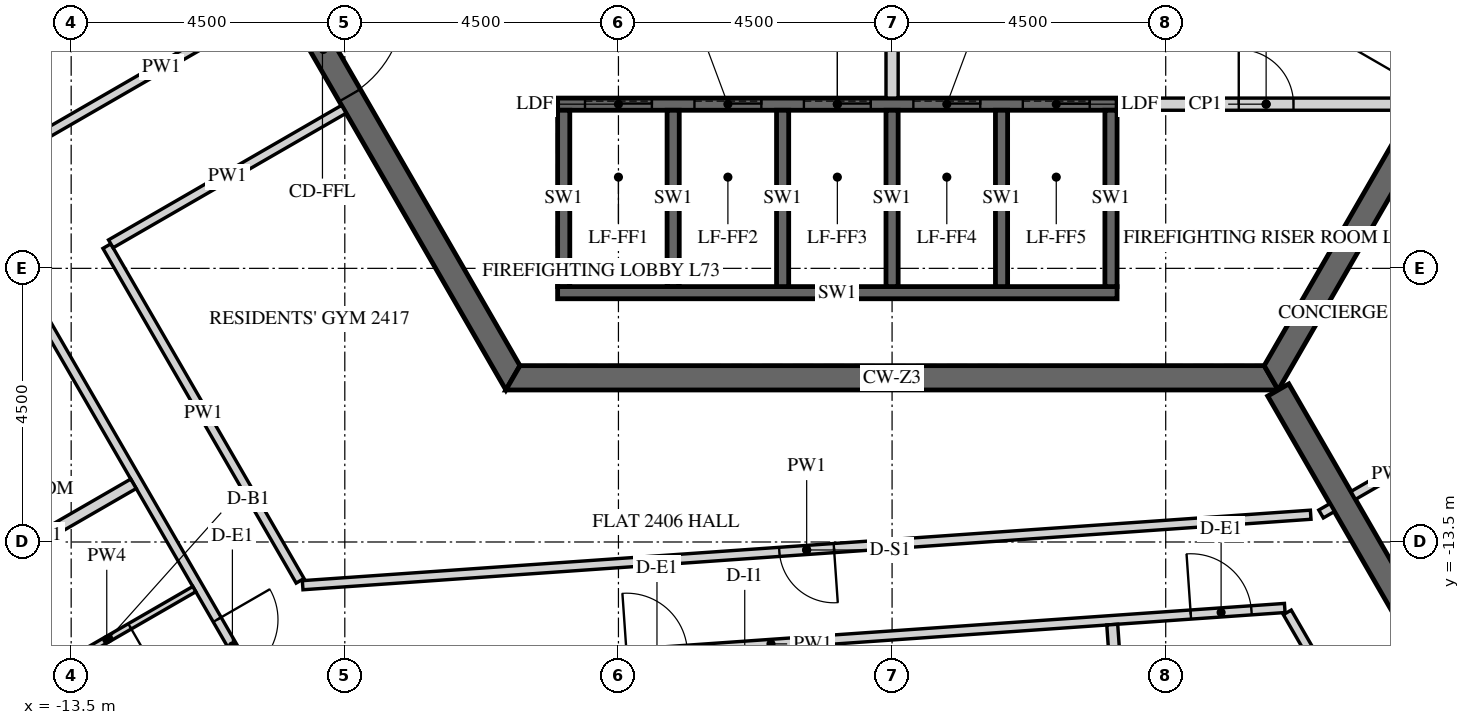
"""IFC4 building model, lengths in metres.
Left out: names, types, materials, properties, quantities, classifications, styles, units other than length and angle.
Written with IfcOpenShell. Run it as: python <this file> out.ifc"""

import sys

from ifc_helpers import new_model, si_unit, direction, frame, frame_2d, origin, place, context, subcontext, project, spatial, polyline, rectangle, outline, extrude, element, fill, save


model = new_model("IFC4")
c1 = context("Model", 3, precision=1e-05, world=origin(), true_north=direction((0.0, 1.0)))
c2 = subcontext(c1, "Body", "Model", "MODEL_VIEW")
j1 = project(units=[si_unit("LENGTHUNIT", "METRE"), si_unit("PLANEANGLEUNIT", "RADIAN")], contexts=[c1])
p1 = place(None, origin())
s1 = spatial("IfcSite", under=j1, at=p1, CompositionType="ELEMENT")
p2 = place(p1, origin())
s2 = spatial("IfcBuilding", under=s1, at=p2, CompositionType="ELEMENT")
p3 = place(p2, frame((0.0, 0.0, 303.0)))
s3 = spatial("IfcBuildingStorey", under=s2, at=p3, CompositionType="ELEMENT", Elevation=303.0)
p4 = place(p3, frame((-12.471, 0.0, -0.15), z_axis=(0.0, 0.0, 1.0), x_axis=(0.499996419489, -0.866027470984, 0.0)))
e1 = element("IfcWall", 1, at=p4, inside=s3, PredefinedType="SHEAR", context=c2, shape_type="SweptSolid", body=[
    extrude(outline(polyline([(-0.115, -0.2), (12.586, -0.2), (12.355, 0.2), (0.115, 0.2), (-0.115, -0.2)])), origin(), (0.0, 0.0, 1.0), 3.9),
])
p5 = place(p4, frame((5.306, 0.0, 0.15)))
e2 = element("IfcOpeningElement", 2, at=p5, cuts=e1, PredefinedType="OPENING", context=c2, shape_type="SweptSolid", body=[
    extrude(rectangle(XDim=1.8, YDim=2.4, at=frame_2d((0.9, 1.2))), frame((0.0, 0.21, 0.0), z_axis=(0.0, -1.0, 0.0), x_axis=(1.0, 0.0, 0.0)), (0.0, 0.0, 1.0), 0.42),
])
p6 = place(p3, frame((-6.235, -10.8, -0.15), z_axis=(0.0, 0.0, 1.0), x_axis=(1.0, 0.0, 0.0)))
e3 = element("IfcWall", 3, at=p6, inside=s3, PredefinedType="SHEAR", context=c2, shape_type="SweptSolid", body=[
    extrude(outline(polyline([(-0.115, -0.2), (12.586, -0.2), (12.355, 0.2), (0.115, 0.2), (-0.115, -0.2)])), origin(), (0.0, 0.0, 1.0), 3.9),
])
p7 = place(p3, frame((6.235, -10.8, -0.15), z_axis=(0.0, 0.0, 1.0), x_axis=(0.499996419489, 0.866027470984, 0.0)))
e4 = element("IfcWall", 4, at=p7, inside=s3, PredefinedType="SHEAR", context=c2, shape_type="SweptSolid", body=[
    extrude(outline(polyline([(-0.115, -0.2), (12.586, -0.2), (12.355, 0.2), (0.115, 0.2), (-0.115, -0.2)])), origin(), (0.0, 0.0, 1.0), 3.9),
])
p8 = place(p7, frame((5.364, 0.0, 0.15)))
e5 = element("IfcOpeningElement", 5, at=p8, cuts=e4, PredefinedType="OPENING", context=c2, shape_type="SweptSolid", body=[
    extrude(rectangle(XDim=1.8, YDim=2.4, at=frame_2d((0.9, 1.2))), frame((0.0, 0.21, 0.0), z_axis=(0.0, -1.0, 0.0), x_axis=(1.0, 0.0, 0.0)), (0.0, 0.0, 1.0), 0.42),
])
p9 = place(p3, frame((6.351, -11.0, -0.15), z_axis=(0.0, 0.0, 1.0), x_axis=(0.499998894578, -0.866026041999, 0.0)))
e6 = element("IfcWall", 6, at=p9, inside=s3, PredefinedType="SHEAR", context=c2, shape_type="SweptSolid", body=[
    extrude(rectangle(XDim=15.544, YDim=0.4, at=frame_2d((7.772, 0.0))), origin(), (0.0, 0.0, 1.0), 3.9),
])
p10 = place(p9, frame((6.872, 0.0, 0.15)))
e7 = element("IfcOpeningElement", 7, at=p10, cuts=e6, PredefinedType="OPENING", context=c2, shape_type="SweptSolid", body=[
    extrude(rectangle(XDim=1.8, YDim=2.4, at=frame_2d((0.9, 1.2))), frame((0.0, 0.21, 0.0), z_axis=(0.0, -1.0, 0.0), x_axis=(1.0, 0.0, 0.0)), (0.0, 0.0, 1.0), 0.42),
])
p11 = place(p3, frame((-5.5, -6.3, -0.25), z_axis=(0.0, 0.0, 1.0), x_axis=(1.0, 0.0, 0.0)))
e8 = element("IfcWall", 8, at=p11, inside=s3, PredefinedType="SHEAR", context=c2, shape_type="SweptSolid", body=[
    extrude(rectangle(XDim=9.2, YDim=0.2, at=frame_2d((4.6, 0.0))), origin(), (0.0, 0.0, 1.0), 3.9),
])
p12 = place(p11, frame((0.45, 0.0, 0.25)))
e9 = element("IfcOpeningElement", 9, at=p12, cuts=e8, PredefinedType="OPENING", context=c2, shape_type="SweptSolid", body=[
    extrude(rectangle(XDim=1.1, YDim=2.1, at=frame_2d((0.55, 1.05))), frame((0.0, 0.11, 0.0), z_axis=(0.0, -1.0, 0.0), x_axis=(1.0, 0.0, 0.0)), (0.0, 0.0, 1.0), 0.22),
])
p13 = place(p11, frame((2.25, 0.0, 0.25)))
e10 = element("IfcOpeningElement", 10, at=p13, cuts=e8, PredefinedType="OPENING", context=c2, shape_type="SweptSolid", body=[
    extrude(rectangle(XDim=1.1, YDim=2.1, at=frame_2d((0.55, 1.05))), frame((0.0, 0.11, 0.0), z_axis=(0.0, -1.0, 0.0), x_axis=(1.0, 0.0, 0.0)), (0.0, 0.0, 1.0), 0.22),
])
p14 = place(p11, frame((4.05, 0.0, 0.25)))
e11 = element("IfcOpeningElement", 11, at=p14, cuts=e8, PredefinedType="OPENING", context=c2, shape_type="SweptSolid", body=[
    extrude(rectangle(XDim=1.1, YDim=2.1, at=frame_2d((0.55, 1.05))), frame((0.0, 0.11, 0.0), z_axis=(0.0, -1.0, 0.0), x_axis=(1.0, 0.0, 0.0)), (0.0, 0.0, 1.0), 0.22),
])
p15 = place(p11, frame((5.85, 0.0, 0.25)))
e12 = element("IfcOpeningElement", 12, at=p15, cuts=e8, PredefinedType="OPENING", context=c2, shape_type="SweptSolid", body=[
    extrude(rectangle(XDim=1.1, YDim=2.1, at=frame_2d((0.55, 1.05))), frame((0.0, 0.11, 0.0), z_axis=(0.0, -1.0, 0.0), x_axis=(1.0, 0.0, 0.0)), (0.0, 0.0, 1.0), 0.22),
])
p16 = place(p11, frame((7.65, 0.0, 0.25)))
e13 = element("IfcOpeningElement", 13, at=p16, cuts=e8, PredefinedType="OPENING", context=c2, shape_type="SweptSolid", body=[
    extrude(rectangle(XDim=1.1, YDim=2.1, at=frame_2d((0.55, 1.05))), frame((0.0, 0.11, 0.0), z_axis=(0.0, -1.0, 0.0), x_axis=(1.0, 0.0, 0.0)), (0.0, 0.0, 1.0), 0.22),
])
p17 = place(p3, frame((-5.5, -9.4, -0.25), z_axis=(0.0, 0.0, 1.0), x_axis=(1.0, 0.0, 0.0)))
e14 = element("IfcWall", 14, at=p17, inside=s3, PredefinedType="SHEAR", context=c2, shape_type="SweptSolid", body=[
    extrude(rectangle(XDim=9.2, YDim=0.2, at=frame_2d((4.6, 0.0))), origin(), (0.0, 0.0, 1.0), 3.9),
])
for number, where, z_axis, x_axis in (
    (15, (-5.4, -9.3, -0.25), (0.0, 0.0, 1.0), (0.0, 1.0, 0.0)),
    (16, (-3.6, -9.3, -0.25), (0.0, 0.0, 1.0), (0.0, 1.0, 0.0)),
    (17, (-1.8, -9.3, -0.25), (0.0, 0.0, 1.0), (0.0, 1.0, 0.0)),
    (18, (0.0, -9.3, -0.25), (0.0, 0.0, 1.0), (0.0, 1.0, 0.0)),
    (19, (1.8, -9.3, -0.25), (0.0, 0.0, 1.0), (0.0, 1.0, 0.0)),
    (20, (3.6, -9.3, -0.25), (0.0, 0.0, 1.0), (0.0, 1.0, 0.0)),
):
    element("IfcWall", number, at=place(p3, frame(where, z_axis=z_axis, x_axis=x_axis)), inside=s3, PredefinedType="SHEAR", context=c2, shape_type="SweptSolid", body=[
        extrude(rectangle(XDim=2.9, YDim=0.2, at=frame_2d((1.45, 0.0))), origin(), (0.0, 0.0, 1.0), 3.9),
    ])
p18 = place(p3, frame((0.0, -6.2, 0.0), z_axis=(0.0, 0.0, 1.0), x_axis=(0.0, 1.0, 0.0)))
e21 = element("IfcWall", 21, at=p18, inside=s3, PredefinedType="PARTITIONING", context=c2, shape_type="SweptSolid", body=[
    extrude(rectangle(XDim=6.1, YDim=0.2, at=frame_2d((3.05, 0.0))), origin(), (0.0, 0.0, 1.0), 3.65),
])
p19 = place(p3, frame((3.7, -6.3, 0.0), z_axis=(0.0, 0.0, 1.0), x_axis=(1.0, 0.0, 0.0)))
e22 = element("IfcWall", 22, at=p19, inside=s3, PredefinedType="PARTITIONING", context=c2, shape_type="SweptSolid", body=[
    extrude(rectangle(XDim=4.903, YDim=0.2, at=frame_2d((2.451, 0.0))), origin(), (0.0, 0.0, 1.0), 3.65),
])
p20 = place(p19, frame((2.001, 0.0, 0.0)))
e23 = element("IfcOpeningElement", 23, at=p20, cuts=e22, PredefinedType="OPENING", context=c2, shape_type="SweptSolid", body=[
    extrude(rectangle(XDim=0.9, YDim=2.1, at=frame_2d((0.45, 1.05))), frame((0.0, 0.11, 0.0), z_axis=(0.0, -1.0, 0.0), x_axis=(1.0, 0.0, 0.0)), (0.0, 0.0, 1.0), 0.22),
])
p21 = place(p3, frame((-18.036, -2.761, 0.0), z_axis=(0.0, 0.0, 1.0), x_axis=(0.499996279807, -0.866027551628, 0.0)))
e24 = element("IfcWall", 24, at=p21, inside=s3, PredefinedType="PARTITIONING", context=c2, shape_type="SweptSolid", body=[
    extrude(rectangle(XDim=15.024, YDim=0.15, at=frame_2d((7.512, 0.0))), origin(), (0.0, 0.0, 1.0), 2.988),
])
p22 = place(p21, frame((0.8, 0.0, 0.0)))
e25 = element("IfcOpeningElement", 25, at=p22, cuts=e24, PredefinedType="OPENING", context=c2, shape_type="SweptSolid", body=[
    extrude(rectangle(XDim=1.0, YDim=2.1, at=frame_2d((0.5, 1.05))), frame((0.0, 0.085, 0.0), z_axis=(0.0, -1.0, 0.0), x_axis=(1.0, 0.0, 0.0)), (0.0, 0.0, 1.0), 0.17),
])
p23 = place(p21, frame((13.874, 0.0, 0.0)))
e26 = element("IfcOpeningElement", 26, at=p23, cuts=e24, PredefinedType="OPENING", context=c2, shape_type="SweptSolid", body=[
    extrude(rectangle(XDim=1.0, YDim=2.1, at=frame_2d((0.5, 1.05))), frame((0.0, 0.085, 0.0), z_axis=(0.0, -1.0, 0.0), x_axis=(1.0, 0.0, 0.0)), (0.0, 0.0, 1.0), 0.17),
])
p24 = place(p3, frame((-10.44, -15.767, 0.0), z_axis=(0.0, 0.0, 1.0), x_axis=(0.997565037323, 0.069742356651, 0.0)))
e27 = element("IfcWall", 27, at=p24, inside=s3, PredefinedType="PARTITIONING", context=c2, shape_type="SweptSolid", body=[
    extrude(rectangle(XDim=16.939, YDim=0.15, at=frame_2d((8.47, 0.0))), origin(), (0.0, 0.0, 1.0), 2.988),
])
p25 = place(p24, frame((6.09, 0.0, 0.0)))
e28 = element("IfcOpeningElement", 28, at=p25, cuts=e27, PredefinedType="OPENING", context=c2, shape_type="SweptSolid", body=[
    extrude(rectangle(XDim=1.0, YDim=2.1, at=frame_2d((0.5, 1.05))), frame((0.0, 0.085, 0.0), z_axis=(0.0, -1.0, 0.0), x_axis=(1.0, 0.0, 0.0)), (0.0, 0.0, 1.0), 0.17),
])
p26 = place(p24, frame((15.39, 0.0, 0.0)))
e29 = element("IfcOpeningElement", 29, at=p26, cuts=e27, PredefinedType="OPENING", context=c2, shape_type="SweptSolid", body=[
    extrude(rectangle(XDim=1.0, YDim=2.1, at=frame_2d((0.5, 1.05))), frame((0.0, 0.085, 0.0), z_axis=(0.0, -1.0, 0.0), x_axis=(1.0, 0.0, 0.0)), (0.0, 0.0, 1.0), 0.17),
])
p27 = place(p3, frame((6.5, -14.657, 0.0), z_axis=(0.0, 0.0, 1.0), x_axis=(0.499966098742, -0.8660449758, 0.0)))
e30 = element("IfcWall", 30, at=p27, inside=s3, PredefinedType="PARTITIONING", context=c2, shape_type="SweptSolid", body=[
    extrude(rectangle(XDim=7.431, YDim=0.15, at=frame_2d((3.715, 0.0))), origin(), (0.0, 0.0, 1.0), 2.988),
])
p28 = place(p27, frame((4.03, 0.0, 0.0)))
e31 = element("IfcOpeningElement", 31, at=p28, cuts=e30, PredefinedType="OPENING", context=c2, shape_type="SweptSolid", body=[
    extrude(rectangle(XDim=1.0, YDim=2.1, at=frame_2d((0.5, 1.05))), frame((0.0, 0.085, 0.0), z_axis=(0.0, -1.0, 0.0), x_axis=(1.0, 0.0, 0.0)), (0.0, 0.0, 1.0), 0.17),
])
p29 = place(p3, frame((-10.066, -4.566, 0.0), z_axis=(0.0, 0.0, 1.0), x_axis=(-0.866031096941, -0.499990139034, 0.0)))
e32 = element("IfcWall", 32, at=p29, inside=s3, PredefinedType="PARTITIONING", context=c2, shape_type="SweptSolid", body=[
    extrude(rectangle(XDim=4.5, YDim=0.15, at=frame_2d((2.25, 0.0))), origin(), (0.0, 0.0, 1.0), 2.988),
])
p30 = place(p3, frame((7.237, -12.935, 0.0), z_axis=(0.0, 0.0, 1.0), x_axis=(-0.866088799389, -0.499890179513, 0.0)))
e33 = element("IfcWall", 33, at=p30, inside=s3, PredefinedType="PARTITIONING", context=c2, shape_type="SweptSolid", body=[
    extrude(rectangle(XDim=0.21, YDim=0.15, at=frame_2d((0.105, 0.0))), origin(), (0.0, 0.0, 1.0), 2.988),
])
p31 = place(p3, frame((6.884, -13.052, 0.0), z_axis=(0.0, 0.0, 1.0), x_axis=(-0.997564224443, -0.069753982764, 0.0)))
e34 = element("IfcWall", 34, at=p31, inside=s3, PredefinedType="PARTITIONING", context=c2, shape_type="SweptSolid", body=[
    extrude(rectangle(XDim=16.618, YDim=0.15, at=frame_2d((8.309, 0.0))), origin(), (0.0, 0.0, 1.0), 2.988),
])
p32 = place(p31, frame((7.859, 0.0, 0.0)))
e35 = element("IfcOpeningElement", 35, at=p32, cuts=e34, PredefinedType="OPENING", context=c2, shape_type="SweptSolid", body=[
    extrude(rectangle(XDim=0.9, YDim=2.1, at=frame_2d((0.45, 1.05))), frame((0.0, 0.085, 0.0), z_axis=(0.0, -1.0, 0.0), x_axis=(1.0, 0.0, 0.0)), (0.0, 0.0, 1.0), 0.17),
])
p33 = place(p3, frame((-9.735, -14.138, 0.0), z_axis=(0.0, 0.0, 1.0), x_axis=(-0.500018385592, 0.866014788598, 0.0)))
e36 = element("IfcWall", 36, at=p33, inside=s3, PredefinedType="PARTITIONING", context=c2, shape_type="SweptSolid", body=[
    extrude(rectangle(XDim=6.356, YDim=0.15, at=frame_2d((3.178, 0.0))), origin(), (0.0, 0.0, 1.0), 2.988),
])
p34 = place(p3, frame((-12.848, -8.597, 0.0), z_axis=(0.0, 0.0, 1.0), x_axis=(0.866017452598, 0.500013771606, 0.0)))
e37 = element("IfcWall", 37, at=p34, inside=s3, PredefinedType="PARTITIONING", context=c2, shape_type="SweptSolid", body=[
    extrude(rectangle(XDim=4.425, YDim=0.15, at=frame_2d((2.213, 0.0))), origin(), (0.0, 0.0, 1.0), 2.988),
])
p35 = place(p3, frame((8.817, -12.022, 0.0), z_axis=(0.0, 0.0, 1.0), x_axis=(-0.866062911188, -0.499935029643, 0.0)))
e38 = element("IfcWall", 38, at=p35, inside=s3, PredefinedType="PARTITIONING", context=c2, shape_type="SweptSolid", body=[
    extrude(rectangle(XDim=1.425, YDim=0.15, at=frame_2d((0.712, 0.0))), origin(), (0.0, 0.0, 1.0), 2.988),
])
p36 = place(p3, frame((-19.771, -16.755, 0.0), z_axis=(0.0, 0.0, 1.0), x_axis=(0.866026819143, 0.499997548519, 0.0)))
e39 = element("IfcWall", 39, at=p36, inside=s3, PredefinedType="PARTITIONING", context=c2, shape_type="SweptSolid", body=[
    extrude(rectangle(XDim=8.425, YDim=0.18, at=frame_2d((4.212, 0.0))), origin(), (0.0, 0.0, 1.0), 2.988),
])
p37 = place(p3, frame((-11.475, -14.275, 0.0), z_axis=(0.0, 0.0, 1.0), x_axis=(-0.866002163101, -0.500040251884, 0.0)))
e40 = element("IfcWall", 40, at=p37, inside=s3, PredefinedType="PARTITIONING", context=c2, shape_type="SweptSolid", body=[
    extrude(rectangle(XDim=3.325, YDim=0.1, at=frame_2d((1.663, 0.0))), origin(), (0.0, 0.0, 1.0), 2.988),
])
p38 = place(p37, frame((1.225, 0.0, 0.0)))
e41 = element("IfcOpeningElement", 41, at=p38, cuts=e40, PredefinedType="OPENING", context=c2, shape_type="SweptSolid", body=[
    extrude(rectangle(XDim=0.8, YDim=2.1, at=frame_2d((0.4, 1.05))), frame((0.0, 0.06, 0.0), z_axis=(0.0, -1.0, 0.0), x_axis=(1.0, 0.0, 0.0)), (0.0, 0.0, 1.0), 0.12),
])
p39 = place(p3, frame((4.208, -23.263, 0.0), z_axis=(0.0, 0.0, 1.0), x_axis=(-0.069749826803, 0.997564515037, 0.0)))
e42 = element("IfcWall", 42, at=p39, inside=s3, PredefinedType="PARTITIONING", context=c2, shape_type="SweptSolid", body=[
    extrude(rectangle(XDim=8.425, YDim=0.18, at=frame_2d((4.212, 0.0))), origin(), (0.0, 0.0, 1.0), 2.988),
])
p40 = place(p5, origin())
e43 = element("IfcDoor", 43, at=p40, inside=s3, OperationType="DOUBLE_DOOR_SINGLE_SWING", PredefinedType="DOOR", context=c2, shape_type="SweptSolid", body=[
    extrude(rectangle(XDim=1.8, YDim=2.4, at=frame_2d((0.9, 1.2))), frame((0.0, 0.025, 0.0), z_axis=(0.0, -1.0, 0.0), x_axis=(1.0, 0.0, 0.0)), (0.0, 0.0, 1.0), 0.05),
])
fill(e2, e43)
p41 = place(p20, origin())
e44 = element("IfcDoor", 44, at=p41, inside=s3, OperationType="SINGLE_SWING_LEFT", PredefinedType="DOOR", context=c2, shape_type="SweptSolid", body=[
    extrude(rectangle(XDim=0.9, YDim=2.1, at=frame_2d((0.45, 1.05))), frame((0.0, 0.025, 0.0), z_axis=(0.0, -1.0, 0.0), x_axis=(1.0, 0.0, 0.0)), (0.0, 0.0, 1.0), 0.05),
])
fill(e23, e44)
p42 = place(p12, origin())
e45 = element("IfcDoor", 45, at=p42, inside=s3, OperationType="SLIDING_TO_LEFT", PredefinedType="DOOR", context=c2, shape_type="SweptSolid", body=[
    extrude(rectangle(XDim=1.1, YDim=2.1, at=frame_2d((0.55, 1.05))), frame((0.0, 0.025, 0.0), z_axis=(0.0, -1.0, 0.0), x_axis=(1.0, 0.0, 0.0)), (0.0, 0.0, 1.0), 0.05),
])
fill(e9, e45)
p43 = place(p13, origin())
e46 = element("IfcDoor", 46, at=p43, inside=s3, OperationType="SLIDING_TO_LEFT", PredefinedType="DOOR", context=c2, shape_type="SweptSolid", body=[
    extrude(rectangle(XDim=1.1, YDim=2.1, at=frame_2d((0.55, 1.05))), frame((0.0, 0.025, 0.0), z_axis=(0.0, -1.0, 0.0), x_axis=(1.0, 0.0, 0.0)), (0.0, 0.0, 1.0), 0.05),
])
fill(e10, e46)
p44 = place(p14, origin())
e47 = element("IfcDoor", 47, at=p44, inside=s3, OperationType="SLIDING_TO_LEFT", PredefinedType="DOOR", context=c2, shape_type="SweptSolid", body=[
    extrude(rectangle(XDim=1.1, YDim=2.1, at=frame_2d((0.55, 1.05))), frame((0.0, 0.025, 0.0), z_axis=(0.0, -1.0, 0.0), x_axis=(1.0, 0.0, 0.0)), (0.0, 0.0, 1.0), 0.05),
])
fill(e11, e47)
p45 = place(p15, origin())
e48 = element("IfcDoor", 48, at=p45, inside=s3, OperationType="SLIDING_TO_LEFT", PredefinedType="DOOR", context=c2, shape_type="SweptSolid", body=[
    extrude(rectangle(XDim=1.1, YDim=2.1, at=frame_2d((0.55, 1.05))), frame((0.0, 0.025, 0.0), z_axis=(0.0, -1.0, 0.0), x_axis=(1.0, 0.0, 0.0)), (0.0, 0.0, 1.0), 0.05),
])
fill(e12, e48)
p46 = place(p16, origin())
e49 = element("IfcDoor", 49, at=p46, inside=s3, OperationType="SLIDING_TO_LEFT", PredefinedType="DOOR", context=c2, shape_type="SweptSolid", body=[
    extrude(rectangle(XDim=1.1, YDim=2.1, at=frame_2d((0.55, 1.05))), frame((0.0, 0.025, 0.0), z_axis=(0.0, -1.0, 0.0), x_axis=(1.0, 0.0, 0.0)), (0.0, 0.0, 1.0), 0.05),
])
fill(e13, e49)
p47 = place(p23, origin())
e50 = element("IfcDoor", 50, at=p47, inside=s3, OperationType="SINGLE_SWING_LEFT", PredefinedType="DOOR", context=c2, shape_type="SweptSolid", body=[
    extrude(rectangle(XDim=1.0, YDim=2.1, at=frame_2d((0.5, 1.05))), frame((0.0, 0.025, 0.0), z_axis=(0.0, -1.0, 0.0), x_axis=(1.0, 0.0, 0.0)), (0.0, 0.0, 1.0), 0.05),
])
fill(e26, e50)
p48 = place(p38, origin())
e51 = element("IfcDoor", 51, at=p48, inside=s3, OperationType="SINGLE_SWING_RIGHT", PredefinedType="DOOR", context=c2, shape_type="SweptSolid", body=[
    extrude(rectangle(XDim=0.8, YDim=2.1, at=frame_2d((0.4, 1.05))), frame((0.0, 0.025, 0.0), z_axis=(0.0, -1.0, 0.0), x_axis=(1.0, 0.0, 0.0)), (0.0, 0.0, 1.0), 0.05),
])
fill(e41, e51)
p49 = place(p26, origin())
e52 = element("IfcDoor", 52, at=p49, inside=s3, OperationType="SINGLE_SWING_LEFT", PredefinedType="DOOR", context=c2, shape_type="SweptSolid", body=[
    extrude(rectangle(XDim=1.0, YDim=2.1, at=frame_2d((0.5, 1.05))), frame((0.0, 0.025, 0.0), z_axis=(0.0, -1.0, 0.0), x_axis=(1.0, 0.0, 0.0)), (0.0, 0.0, 1.0), 0.05),
])
fill(e29, e52)
p50 = place(p32, origin())
e53 = element("IfcDoor", 53, at=p50, inside=s3, OperationType="SINGLE_SWING_RIGHT", PredefinedType="DOOR", context=c2, shape_type="SweptSolid", body=[
    extrude(rectangle(XDim=0.9, YDim=2.1, at=frame_2d((0.45, 1.05))), frame((0.0, 0.025, 0.0), z_axis=(0.0, -1.0, 0.0), x_axis=(1.0, 0.0, 0.0)), (0.0, 0.0, 1.0), 0.05),
])
fill(e35, e53)
save(model, sys.argv[1])
